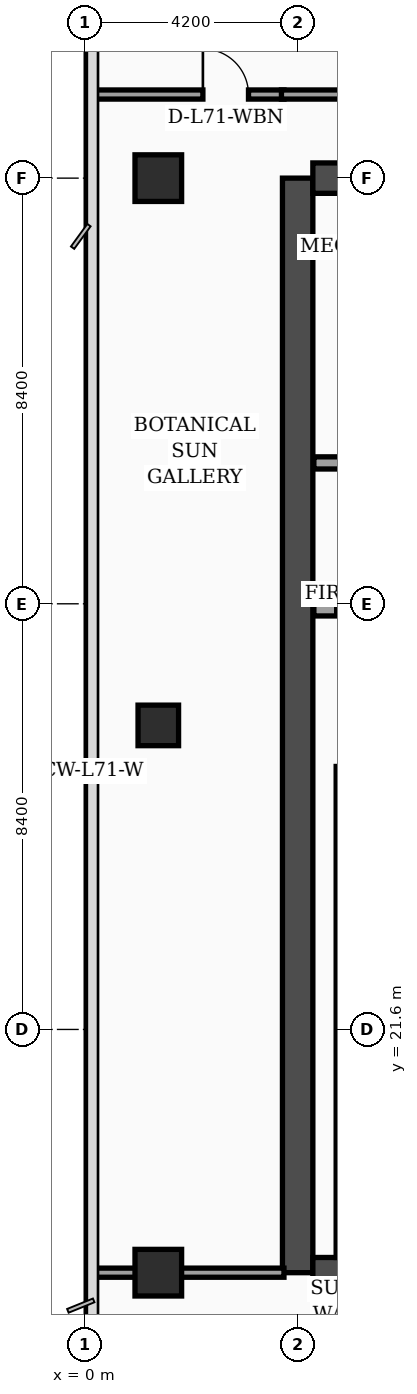
"""IFC4 building model, lengths in metres.
Left out: names, types, materials, properties, quantities, classifications, styles, units other than length and angle.
Written with IfcOpenShell. Run it as: python <this file> out.ifc"""

import sys

from ifc_helpers import new_model, si_unit, direction, frame, frame_2d, origin, origin_2d, place, context, subcontext, project, spatial, rectangle, extrude, element, fill, save


model = new_model("IFC4")
c1 = context("Model", 3, precision=1e-05, world=origin(), true_north=direction((0.0, 1.0)))
c2 = subcontext(c1, "Body", "Model", "MODEL_VIEW")
j1 = project(units=[si_unit("LENGTHUNIT", "METRE"), si_unit("PLANEANGLEUNIT", "RADIAN")], contexts=[c1])
p1 = place(None, origin())
s1 = spatial("IfcSite", under=j1, at=p1, CompositionType="ELEMENT")
p2 = place(p1, origin())
s2 = spatial("IfcBuilding", under=s1, at=p2, CompositionType="ELEMENT")
p3 = place(p2, frame((0.0, 0.0, 287.3)))
s3 = spatial("IfcBuildingStorey", under=s2, at=p3, CompositionType="ELEMENT", Elevation=287.3)
p4 = place(p3, frame((4.2, 16.8, 0.0), z_axis=(0.0, 0.0, 1.0), x_axis=(0.0, 1.0, 0.0)))
e1 = element("IfcWall", 1, at=p4, inside=s3, PredefinedType="SHEAR", context=c2, shape_type="SweptSolid", body=[
    extrude(rectangle(XDim=21.6, YDim=0.6, at=frame_2d((10.8, 0.0))), origin(), (0.0, 0.0, 1.0), 3.56),
])
p5 = place(p3, frame((4.5, 38.4, 0.0), z_axis=(0.0, 0.0, 1.0), x_axis=(1.0, 0.0, 0.0)))
e2 = element("IfcWall", 2, at=p5, inside=s3, PredefinedType="SHEAR", context=c2, shape_type="SweptSolid", body=[
    extrude(rectangle(XDim=10.2, YDim=0.6, at=frame_2d((5.1, 0.0))), origin(), (0.0, 0.0, 1.0), 3.56),
])
p6 = place(p5, frame((5.8, 0.0, 0.0)))
e3 = element("IfcOpeningElement", 3, at=p6, cuts=e2, PredefinedType="OPENING", context=c2, shape_type="SweptSolid", body=[
    extrude(rectangle(XDim=1.1, YDim=2.2, at=frame_2d((0.55, 1.1))), frame((0.0, 0.31, 0.0), z_axis=(0.0, -1.0, 0.0), x_axis=(1.0, 0.0, 0.0)), (0.0, 0.0, 1.0), 0.62),
])
p7 = place(p3, frame((4.5, 16.8, 0.0), z_axis=(0.0, 0.0, 1.0), x_axis=(1.0, 0.0, 0.0)))
e4 = element("IfcWall", 4, at=p7, inside=s3, PredefinedType="SHEAR", context=c2, shape_type="SweptSolid", body=[
    extrude(rectangle(XDim=10.2, YDim=0.6, at=frame_2d((5.1, 0.0))), origin(), (0.0, 0.0, 1.0), 3.56),
])
p8 = place(p3, frame((5.08, 17.1, 0.0), z_axis=(0.0, 0.0, 1.0), x_axis=(0.0, 1.0, 0.0)))
e5 = element("IfcWall", 5, at=p8, inside=s3, PredefinedType="SOLIDWALL", context=c2, shape_type="SweptSolid", body=[
    extrude(rectangle(XDim=9.69, YDim=0.24, at=frame_2d((4.845, 0.0))), origin(), (0.0, 0.0, 1.0), 3.56),
])
p9 = place(p3, frame((1.45, 16.8, 0.0), z_axis=(0.0, 0.0, 1.0), x_axis=(1.0, 0.0, 0.0)))
e6 = element("IfcColumn", 6, at=p9, inside=s3, PredefinedType="COLUMN", context=c2, shape_type="SweptSolid", body=[
    extrude(rectangle(XDim=0.92, YDim=0.92, at=origin_2d()), origin(), (0.0, 0.0, 1.0), 3.56),
])
p10 = place(p3, frame((1.45, 27.6, 0.0), z_axis=(0.0, 0.0, 1.0), x_axis=(1.0, 0.0, 0.0)))
e7 = element("IfcColumn", 7, at=p10, inside=s3, PredefinedType="COLUMN", context=c2, shape_type="SweptSolid", body=[
    extrude(rectangle(XDim=0.8, YDim=0.8, at=origin_2d()), origin(), (0.0, 0.0, 1.0), 3.56),
])
p11 = place(p3, frame((1.45, 38.4, 0.0), z_axis=(0.0, 0.0, 1.0), x_axis=(1.0, 0.0, 0.0)))
e8 = element("IfcColumn", 8, at=p11, inside=s3, PredefinedType="COLUMN", context=c2, shape_type="SweptSolid", body=[
    extrude(rectangle(XDim=0.92, YDim=0.92, at=origin_2d()), origin(), (0.0, 0.0, 1.0), 3.56),
])
p12 = place(p3, frame((4.52, 29.88, 0.0), z_axis=(0.0, 0.0, 1.0), x_axis=(1.0, 0.0, 0.0)))
e9 = element("IfcWall", 9, at=p12, inside=s3, PredefinedType="SOLIDWALL", context=c2, shape_type="SweptSolid", body=[
    extrude(rectangle(XDim=4.9, YDim=0.24, at=frame_2d((2.45, 0.0))), origin(), (0.0, 0.0, 1.0), 3.56),
])
p13 = place(p12, frame((0.45, 0.0, 0.0)))
e10 = element("IfcOpeningElement", 10, at=p13, cuts=e9, PredefinedType="OPENING", context=c2, shape_type="SweptSolid", body=[
    extrude(rectangle(XDim=1.3, YDim=2.35, at=frame_2d((0.65, 1.175))), frame((0.0, 0.13, 0.0), z_axis=(0.0, -1.0, 0.0), x_axis=(1.0, 0.0, 0.0)), (0.0, 0.0, 1.0), 0.26),
])
p14 = place(p3, frame((4.52, 32.78, 0.0), z_axis=(0.0, 0.0, 1.0), x_axis=(1.0, 0.0, 0.0)))
e11 = element("IfcWall", 11, at=p14, inside=s3, PredefinedType="SOLIDWALL", context=c2, shape_type="SweptSolid", body=[
    extrude(rectangle(XDim=4.9, YDim=0.24, at=frame_2d((2.45, 0.0))), origin(), (0.0, 0.0, 1.0), 3.19),
])
p15 = place(p3, frame((0.08, 16.8, 0.0), z_axis=(0.0, 0.0, 1.0), x_axis=(1.0, 0.0, 0.0)))
e12 = element("IfcWall", 12, at=p15, inside=s3, PredefinedType="PARTITIONING", context=c2, shape_type="SweptSolid", body=[
    extrude(rectangle(XDim=3.85, YDim=0.18, at=frame_2d((1.925, 0.0))), origin(), (0.0, 0.0, 1.0), 2.99),
])
p16 = place(p3, frame((0.08, 40.05, 0.0), z_axis=(0.0, 0.0, 1.0), x_axis=(1.0, 0.0, 0.0)))
e13 = element("IfcWall", 13, at=p16, inside=s3, PredefinedType="PARTITIONING", context=c2, shape_type="SweptSolid", body=[
    extrude(rectangle(XDim=3.85, YDim=0.18, at=frame_2d((1.925, 0.0))), origin(), (0.0, 0.0, 1.0), 2.99),
])
p17 = place(p16, frame((2.25, 0.0, 0.0)))
e14 = element("IfcOpeningElement", 14, at=p17, cuts=e13, PredefinedType="OPENING", context=c2, shape_type="SweptSolid", body=[
    extrude(rectangle(XDim=0.9, YDim=2.15, at=frame_2d((0.45, 1.075))), frame((0.0, 0.1, 0.0), z_axis=(0.0, -1.0, 0.0), x_axis=(1.0, 0.0, 0.0)), (0.0, 0.0, 1.0), 0.2),
])
p18 = place(p3, frame((3.88, 40.05, 0.0), z_axis=(0.0, 0.0, 1.0), x_axis=(1.0, 0.0, 0.0)))
e15 = element("IfcWall", 15, at=p18, inside=s3, PredefinedType="PARTITIONING", context=c2, shape_type="SweptSolid", body=[
    extrude(rectangle(XDim=11.27, YDim=0.18, at=frame_2d((5.635, 0.0))), origin(), (0.0, 0.0, 1.0), 2.99),
])
p19 = place(p13, origin())
e16 = element("IfcDoor", 16, at=p19, inside=s3, OperationType="DOUBLE_DOOR_SLIDING", PredefinedType="DOOR", context=c2, shape_type="SweptSolid", body=[
    extrude(rectangle(XDim=1.3, YDim=2.35, at=frame_2d((0.65, 1.175))), frame((0.0, 0.025, 0.0), z_axis=(0.0, -1.0, 0.0), x_axis=(1.0, 0.0, 0.0)), (0.0, 0.0, 1.0), 0.05),
])
fill(e10, e16)
p20 = place(p17, origin())
e17 = element("IfcDoor", 17, at=p20, inside=s3, OperationType="SINGLE_SWING_LEFT", PredefinedType="DOOR", context=c2, shape_type="SweptSolid", body=[
    extrude(rectangle(XDim=0.9, YDim=2.15, at=frame_2d((0.45, 1.075))), frame((0.0, 0.025, 0.0), z_axis=(0.0, -1.0, 0.0), x_axis=(1.0, 0.0, 0.0)), (0.0, 0.0, 1.0), 0.05),
])
fill(e14, e17)
save(model, sys.argv[1])
